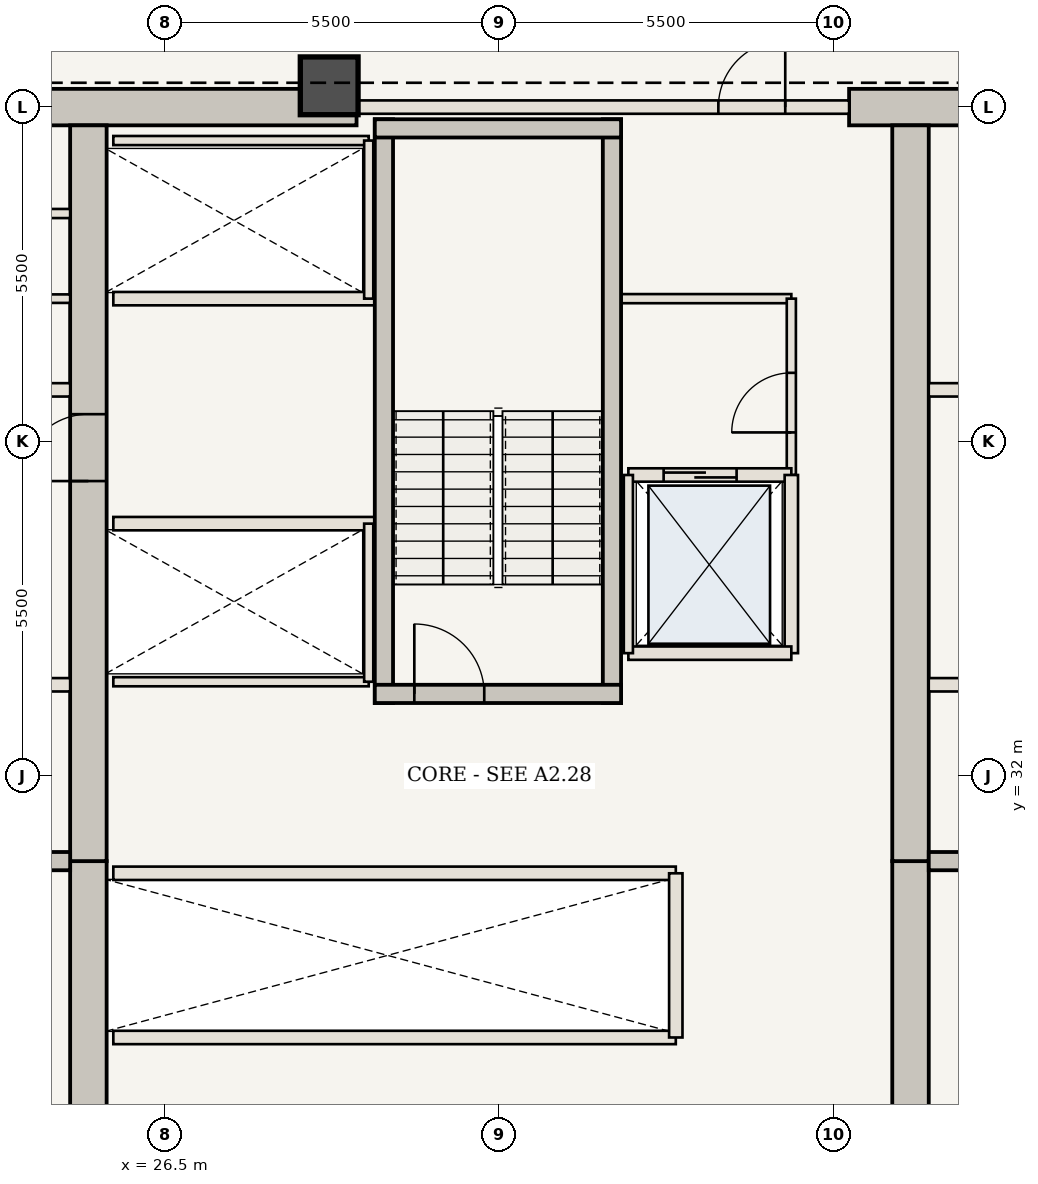
"""IFC4 building model, lengths in metres.
Left out: names, types, materials, properties, quantities, classifications, styles, units other than length and angle.
Written with IfcOpenShell. Run it as: python <this file> out.ifc"""

import sys

from ifc_helpers import new_model, si_unit, direction, frame, frame_2d, origin, origin_2d, place, context, subcontext, project, spatial, rectangle, extrude, element, fill, save


model = new_model("IFC4")
c1 = context("Model", 3, precision=1e-05, world=origin(), true_north=direction((0.0, 1.0)))
c2 = subcontext(c1, "Body", "Model", "MODEL_VIEW")
j1 = project(units=[si_unit("LENGTHUNIT", "METRE"), si_unit("PLANEANGLEUNIT", "RADIAN")], contexts=[c1])
p1 = place(None, origin())
s1 = spatial("IfcSite", under=j1, at=p1, CompositionType="ELEMENT")
p2 = place(p1, origin())
s2 = spatial("IfcBuilding", under=s1, at=p2, CompositionType="ELEMENT")
p3 = place(p2, frame((0.0, 0.0, 118.3)))
s3 = spatial("IfcBuildingStorey", under=s2, at=p3, CompositionType="ELEMENT", Elevation=118.3)
p4 = place(p3, frame((21.41, 43.0, 0.0), z_axis=(0.0, 0.0, 1.0), x_axis=(1.0, 0.0, 0.0)))
e1 = element("IfcWall", 1, at=p4, inside=s3, PredefinedType="SHEAR", context=c2, shape_type="SweptSolid", body=[
    extrude(rectangle(XDim=8.24, YDim=0.6, at=frame_2d((4.12, 0.0))), origin(), (0.0, 0.0, 1.0), 3.85),
])
p5 = place(p3, frame((37.75, 43.0, 0.0), z_axis=(0.0, 0.0, 1.0), x_axis=(1.0, 0.0, 0.0)))
e2 = element("IfcWall", 2, at=p5, inside=s3, PredefinedType="SHEAR", context=c2, shape_type="SweptSolid", body=[
    extrude(rectangle(XDim=4.84, YDim=0.6, at=frame_2d((2.42, 0.0))), origin(), (0.0, 0.0, 1.0), 3.85),
])
p6 = place(p3, frame((25.24, 21.25, 0.0), z_axis=(0.0, 0.0, 1.0), x_axis=(0.0, 1.0, 0.0)))
e3 = element("IfcWall", 3, at=p6, inside=s3, PredefinedType="SHEAR", context=c2, shape_type="SweptSolid", body=[
    extrude(rectangle(XDim=9.35, YDim=0.6, at=frame_2d((4.675, 0.0))), origin(), (0.0, 0.0, 1.0), 3.85),
])
p7 = place(p3, frame((25.24, 30.6, 0.0), z_axis=(0.0, 0.0, 1.0), x_axis=(0.0, 1.0, 0.0)))
e4 = element("IfcWall", 4, at=p7, inside=s3, PredefinedType="SHEAR", context=c2, shape_type="SweptSolid", body=[
    extrude(rectangle(XDim=12.1, YDim=0.6, at=frame_2d((6.05, 0.0))), origin(), (0.0, 0.0, 1.0), 3.85),
])
p8 = place(p7, frame((6.25, 0.0, 0.0)))
e5 = element("IfcOpeningElement", 5, at=p8, cuts=e4, PredefinedType="OPENING", context=c2, shape_type="SweptSolid", body=[
    extrude(rectangle(XDim=1.1, YDim=2.15, at=frame_2d((0.55, 1.075))), frame((0.0, 0.31, 0.0), z_axis=(0.0, -1.0, 0.0), x_axis=(1.0, 0.0, 0.0)), (0.0, 0.0, 1.0), 0.62),
])
p9 = place(p3, frame((38.76, 21.25, 0.0), z_axis=(0.0, 0.0, 1.0), x_axis=(0.0, 1.0, 0.0)))
e6 = element("IfcWall", 6, at=p9, inside=s3, PredefinedType="SHEAR", context=c2, shape_type="SweptSolid", body=[
    extrude(rectangle(XDim=9.35, YDim=0.6, at=frame_2d((4.675, 0.0))), origin(), (0.0, 0.0, 1.0), 3.85),
])
p10 = place(p3, frame((38.76, 30.6, 0.0), z_axis=(0.0, 0.0, 1.0), x_axis=(0.0, 1.0, 0.0)))
e7 = element("IfcWall", 7, at=p10, inside=s3, PredefinedType="SHEAR", context=c2, shape_type="SweptSolid", body=[
    extrude(rectangle(XDim=12.1, YDim=0.6, at=frame_2d((6.05, 0.0))), origin(), (0.0, 0.0, 1.0), 3.85),
])
p11 = place(p3, frame((29.2, 43.35, 0.0), z_axis=(0.0, 0.0, 1.0), x_axis=(1.0, 0.0, 0.0)))
e8 = element("IfcColumn", 8, at=p11, inside=s3, PredefinedType="COLUMN", context=c2, shape_type="SweptSolid", body=[
    extrude(rectangle(XDim=0.95, YDim=0.95, at=origin_2d()), origin(), (0.0, 0.0, 1.0), 3.85),
])
for number, where, z_axis, x_axis in (
    (9, (21.41, 30.6, 0.0), (0.0, 0.0, 1.0), (1.0, 0.0, 0.0)),
    (10, (39.06, 30.6, 0.0), (0.0, 0.0, 1.0), (1.0, 0.0, 0.0)),
):
    element("IfcWall", number, at=place(p3, frame(where, z_axis=z_axis, x_axis=x_axis)), inside=s3, PredefinedType="SHEAR", context=c2, shape_type="SweptSolid", body=[
        extrude(rectangle(XDim=3.53, YDim=0.3, at=frame_2d((1.765, 0.0))), origin(), (0.0, 0.0, 1.0), 3.685),
    ])
p12 = place(p3, frame((21.41, 33.5, 0.0), z_axis=(0.0, 0.0, 1.0), x_axis=(1.0, 0.0, 0.0)))
e11 = element("IfcWall", 11, at=p12, inside=s3, PredefinedType="STANDARD", context=c2, shape_type="SweptSolid", body=[
    extrude(rectangle(XDim=3.53, YDim=0.22, at=frame_2d((1.765, 0.0))), origin(), (0.0, 0.0, 1.0), 3.685),
])
p13 = place(p12, frame((0.75, 0.0, 0.0)))
e12 = element("IfcOpeningElement", 12, at=p13, cuts=e11, PredefinedType="OPENING", context=c2, shape_type="SweptSolid", body=[
    extrude(rectangle(XDim=1.2, YDim=2.2, at=frame_2d((0.6, 1.1))), frame((0.0, 0.12, 0.0), z_axis=(0.0, -1.0, 0.0), x_axis=(1.0, 0.0, 0.0)), (0.0, 0.0, 1.0), 0.24),
])
p14 = place(p3, frame((39.06, 33.5, 0.0), z_axis=(0.0, 0.0, 1.0), x_axis=(1.0, 0.0, 0.0)))
e13 = element("IfcWall", 13, at=p14, inside=s3, PredefinedType="STANDARD", context=c2, shape_type="SweptSolid", body=[
    extrude(rectangle(XDim=3.53, YDim=0.22, at=frame_2d((1.765, 0.0))), origin(), (0.0, 0.0, 1.0), 3.685),
])
p15 = place(p14, frame((1.55, 0.0, 0.0)))
e14 = element("IfcOpeningElement", 14, at=p15, cuts=e13, PredefinedType="OPENING", context=c2, shape_type="SweptSolid", body=[
    extrude(rectangle(XDim=1.2, YDim=2.2, at=frame_2d((0.6, 1.1))), frame((0.0, 0.12, 0.0), z_axis=(0.0, -1.0, 0.0), x_axis=(1.0, 0.0, 0.0)), (0.0, 0.0, 1.0), 0.24),
])
for number, where, z_axis, x_axis in (
    (15, (21.41, 38.35, 0.0), (0.0, 0.0, 1.0), (1.0, 0.0, 0.0)),
    (16, (39.06, 38.35, 0.0), (0.0, 0.0, 1.0), (1.0, 0.0, 0.0)),
):
    element("IfcWall", number, at=place(p3, frame(where, z_axis=z_axis, x_axis=x_axis)), inside=s3, PredefinedType="STANDARD", context=c2, shape_type="SweptSolid", body=[
        extrude(rectangle(XDim=3.53, YDim=0.22, at=frame_2d((1.765, 0.0))), origin(), (0.0, 0.0, 1.0), 3.685),
    ])
p16 = place(p3, frame((21.41, 39.85, 0.0), z_axis=(0.0, 0.0, 1.0), x_axis=(1.0, 0.0, 0.0)))
e17 = element("IfcWall", 17, at=p16, inside=s3, PredefinedType="STANDARD", context=c2, shape_type="SweptSolid", body=[
    extrude(rectangle(XDim=3.53, YDim=0.14, at=frame_2d((1.765, 0.0))), origin(), (0.0, 0.0, 1.0), 3.685),
])
p17 = place(p3, frame((21.41, 41.25, 0.0), z_axis=(0.0, 0.0, 1.0), x_axis=(1.0, 0.0, 0.0)))
e18 = element("IfcWall", 18, at=p17, inside=s3, PredefinedType="STANDARD", context=c2, shape_type="SweptSolid", body=[
    extrude(rectangle(XDim=3.53, YDim=0.15, at=frame_2d((1.765, 0.0))), origin(), (0.0, 0.0, 1.0), 3.685),
])
p18 = place(p3, frame((34.0, 39.85, 0.0), z_axis=(0.0, 0.0, 1.0), x_axis=(1.0, 0.0, 0.0)))
e19 = element("IfcWall", 19, at=p18, inside=s3, PredefinedType="STANDARD", context=c2, shape_type="SweptSolid", body=[
    extrude(rectangle(XDim=2.8, YDim=0.15, at=frame_2d((1.4, 0.0))), origin(), (0.0, 0.0, 1.0), 3.685),
])
p19 = place(p3, frame((36.8, 36.95, 0.0), z_axis=(0.0, 0.0, 1.0), x_axis=(0.0, 1.0, 0.0)))
e20 = element("IfcWall", 20, at=p19, inside=s3, PredefinedType="STANDARD", context=c2, shape_type="SweptSolid", body=[
    extrude(rectangle(XDim=2.9, YDim=0.15, at=frame_2d((1.45, 0.0))), origin(), (0.0, 0.0, 1.0), 3.685),
])
p20 = place(p19, frame((0.7, 0.0, 0.0)))
e21 = element("IfcOpeningElement", 21, at=p20, cuts=e20, PredefinedType="OPENING", context=c2, shape_type="SweptSolid", body=[
    extrude(rectangle(XDim=0.98, YDim=2.2, at=frame_2d((0.49, 1.1))), frame((0.0, 0.085, 0.0), z_axis=(0.0, -1.0, 0.0), x_axis=(1.0, 0.0, 0.0)), (0.0, 0.0, 1.0), 0.17),
])
for number, where, z_axis, x_axis in (
    (22, (25.65, 27.7, 0.0), (0.0, 0.0, 1.0), (1.0, 0.0, 0.0)),
    (23, (25.65, 30.4, 0.0), (0.0, 0.0, 1.0), (1.0, 0.0, 0.0)),
):
    element("IfcWall", number, at=place(p3, frame(where, z_axis=z_axis, x_axis=x_axis)), inside=s3, PredefinedType="STANDARD", context=c2, shape_type="SweptSolid", body=[
        extrude(rectangle(XDim=9.25, YDim=0.22, at=frame_2d((4.625, 0.0))), origin(), (0.0, 0.0, 1.0), 3.685),
    ])
p21 = place(p3, frame((34.9, 27.7, 0.0), z_axis=(0.0, 0.0, 1.0), x_axis=(0.0, 1.0, 0.0)))
e24 = element("IfcWall", 24, at=p21, inside=s3, PredefinedType="STANDARD", context=c2, shape_type="SweptSolid", body=[
    extrude(rectangle(XDim=2.7, YDim=0.22, at=frame_2d((1.35, 0.0))), origin(), (0.0, 0.0, 1.0), 3.685),
])
p22 = place(p3, frame((25.65, 36.15, 0.0), z_axis=(0.0, 0.0, 1.0), x_axis=(1.0, 0.0, 0.0)))
e25 = element("IfcWall", 25, at=p22, inside=s3, PredefinedType="STANDARD", context=c2, shape_type="SweptSolid", body=[
    extrude(rectangle(XDim=4.3, YDim=0.22, at=frame_2d((2.15, 0.0))), origin(), (0.0, 0.0, 1.0), 3.685),
])
p23 = place(p3, frame((25.65, 33.55, 0.0), z_axis=(0.0, 0.0, 1.0), x_axis=(1.0, 0.0, 0.0)))
e26 = element("IfcWall", 26, at=p23, inside=s3, PredefinedType="STANDARD", context=c2, shape_type="SweptSolid", body=[
    extrude(rectangle(XDim=4.2, YDim=0.15, at=frame_2d((2.1, 0.0))), origin(), (0.0, 0.0, 1.0), 3.685),
])
p24 = place(p3, frame((29.85, 33.55, 0.0), z_axis=(0.0, 0.0, 1.0), x_axis=(0.0, 1.0, 0.0)))
e27 = element("IfcWall", 27, at=p24, inside=s3, PredefinedType="STANDARD", context=c2, shape_type="SweptSolid", body=[
    extrude(rectangle(XDim=2.6, YDim=0.15, at=frame_2d((1.3, 0.0))), origin(), (0.0, 0.0, 1.0), 3.685),
])
p25 = place(p3, frame((25.65, 39.85, 0.0), z_axis=(0.0, 0.0, 1.0), x_axis=(1.0, 0.0, 0.0)))
e28 = element("IfcWall", 28, at=p25, inside=s3, PredefinedType="STANDARD", context=c2, shape_type="SweptSolid", body=[
    extrude(rectangle(XDim=4.3, YDim=0.22, at=frame_2d((2.15, 0.0))), origin(), (0.0, 0.0, 1.0), 3.685),
])
p26 = place(p3, frame((25.65, 42.45, 0.0), z_axis=(0.0, 0.0, 1.0), x_axis=(1.0, 0.0, 0.0)))
e29 = element("IfcWall", 29, at=p26, inside=s3, PredefinedType="STANDARD", context=c2, shape_type="SweptSolid", body=[
    extrude(rectangle(XDim=4.2, YDim=0.15, at=frame_2d((2.1, 0.0))), origin(), (0.0, 0.0, 1.0), 3.685),
])
p27 = place(p3, frame((29.85, 39.85, 0.0), z_axis=(0.0, 0.0, 1.0), x_axis=(0.0, 1.0, 0.0)))
e30 = element("IfcWall", 30, at=p27, inside=s3, PredefinedType="STANDARD", context=c2, shape_type="SweptSolid", body=[
    extrude(rectangle(XDim=2.6, YDim=0.15, at=frame_2d((1.3, 0.0))), origin(), (0.0, 0.0, 1.0), 3.685),
])
for number, where, z_axis, x_axis in (
    (31, (30.1, 33.2, 0.0), (0.0, 0.0, 1.0), (0.0, 1.0, 0.0)),
    (32, (33.85, 33.2, 0.0), (0.0, 0.0, 1.0), (0.0, 1.0, 0.0)),
):
    element("IfcWall", number, at=place(p3, frame(where, z_axis=z_axis, x_axis=x_axis)), inside=s3, PredefinedType="SHEAR", context=c2, shape_type="SweptSolid", body=[
        extrude(rectangle(XDim=9.6, YDim=0.3, at=frame_2d((4.8, 0.0))), origin(), (0.0, 0.0, 1.0), 3.685),
    ])
p28 = place(p3, frame((29.95, 33.35, 0.0), z_axis=(0.0, 0.0, 1.0), x_axis=(1.0, 0.0, 0.0)))
e33 = element("IfcWall", 33, at=p28, inside=s3, PredefinedType="SHEAR", context=c2, shape_type="SweptSolid", body=[
    extrude(rectangle(XDim=4.05, YDim=0.3, at=frame_2d((2.025, 0.0))), origin(), (0.0, 0.0, 1.0), 3.685),
])
p29 = place(p28, frame((0.65, 0.0, 0.0)))
e34 = element("IfcOpeningElement", 34, at=p29, cuts=e33, PredefinedType="OPENING", context=c2, shape_type="SweptSolid", body=[
    extrude(rectangle(XDim=1.15, YDim=2.15, at=frame_2d((0.575, 1.075))), frame((0.0, 0.16, 0.0), z_axis=(0.0, -1.0, 0.0), x_axis=(1.0, 0.0, 0.0)), (0.0, 0.0, 1.0), 0.32),
])
p30 = place(p3, frame((29.95, 42.65, 0.0), z_axis=(0.0, 0.0, 1.0), x_axis=(1.0, 0.0, 0.0)))
e35 = element("IfcWall", 35, at=p30, inside=s3, PredefinedType="SHEAR", context=c2, shape_type="SweptSolid", body=[
    extrude(rectangle(XDim=4.05, YDim=0.3, at=frame_2d((2.025, 0.0))), origin(), (0.0, 0.0, 1.0), 3.685),
])
p31 = place(p3, frame((29.65, 43.0, 0.0), z_axis=(0.0, 0.0, 1.0), x_axis=(1.0, 0.0, 0.0)))
e36 = element("IfcWall", 36, at=p31, inside=s3, PredefinedType="STANDARD", context=c2, shape_type="SweptSolid", body=[
    extrude(rectangle(XDim=8.1, YDim=0.22, at=frame_2d((4.05, 0.0))), origin(), (0.0, 0.0, 1.0), 3.685),
])
p32 = place(p31, frame((5.95, 0.0, 0.0)))
e37 = element("IfcOpeningElement", 37, at=p32, cuts=e36, PredefinedType="OPENING", context=c2, shape_type="SweptSolid", body=[
    extrude(rectangle(XDim=1.1, YDim=2.15, at=frame_2d((0.55, 1.075))), frame((0.0, 0.12, 0.0), z_axis=(0.0, -1.0, 0.0), x_axis=(1.0, 0.0, 0.0)), (0.0, 0.0, 1.0), 0.24),
])
p33 = place(p3, frame((34.12, 36.95, 0.0), z_axis=(0.0, 0.0, 1.0), x_axis=(1.0, 0.0, 0.0)))
e38 = element("IfcWall", 38, at=p33, inside=s3, PredefinedType="STANDARD", context=c2, shape_type="SweptSolid", body=[
    extrude(rectangle(XDim=2.68, YDim=0.22, at=frame_2d((1.34, 0.0))), origin(), (0.0, 0.0, 1.0), 3.685),
])
p34 = place(p33, frame((0.58, 0.0, 0.0)))
e39 = element("IfcOpeningElement", 39, at=p34, cuts=e38, PredefinedType="OPENING", context=c2, shape_type="SweptSolid", body=[
    extrude(rectangle(XDim=1.2, YDim=2.2, at=frame_2d((0.6, 1.1))), frame((0.0, 0.12, 0.0), z_axis=(0.0, -1.0, 0.0), x_axis=(1.0, 0.0, 0.0)), (0.0, 0.0, 1.0), 0.24),
])
p35 = place(p3, frame((36.8, 34.02, 0.0), z_axis=(0.0, 0.0, 1.0), x_axis=(0.0, 1.0, 0.0)))
e40 = element("IfcWall", 40, at=p35, inside=s3, PredefinedType="STANDARD", context=c2, shape_type="SweptSolid", body=[
    extrude(rectangle(XDim=2.93, YDim=0.22, at=frame_2d((1.465, 0.0))), origin(), (0.0, 0.0, 1.0), 3.685),
])
p36 = place(p3, frame((34.12, 34.02, 0.0), z_axis=(0.0, 0.0, 1.0), x_axis=(1.0, 0.0, 0.0)))
e41 = element("IfcWall", 41, at=p36, inside=s3, PredefinedType="STANDARD", context=c2, shape_type="SweptSolid", body=[
    extrude(rectangle(XDim=2.68, YDim=0.22, at=frame_2d((1.34, 0.0))), origin(), (0.0, 0.0, 1.0), 3.685),
])
p37 = place(p3, frame((34.12, 34.02, 0.0), z_axis=(0.0, 0.0, 1.0), x_axis=(0.0, 1.0, 0.0)))
e42 = element("IfcWall", 42, at=p37, inside=s3, PredefinedType="STANDARD", context=c2, shape_type="SweptSolid", body=[
    extrude(rectangle(XDim=2.93, YDim=0.15, at=frame_2d((1.465, 0.0))), origin(), (0.0, 0.0, 1.0), 3.685),
])
p38 = place(p8, origin())
e43 = element("IfcDoor", 43, at=p38, inside=s3, OperationType="SINGLE_SWING_LEFT", PredefinedType="DOOR", context=c2, shape_type="SweptSolid", body=[
    extrude(rectangle(XDim=1.1, YDim=2.15, at=frame_2d((0.55, 1.075))), frame((0.0, 0.025, 0.0), z_axis=(0.0, -1.0, 0.0), x_axis=(1.0, 0.0, 0.0)), (0.0, 0.0, 1.0), 0.05),
])
fill(e5, e43)
p39 = place(p20, origin())
e44 = element("IfcDoor", 44, at=p39, inside=s3, OperationType="SINGLE_SWING_LEFT", PredefinedType="DOOR", context=c2, shape_type="SweptSolid", body=[
    extrude(rectangle(XDim=0.98, YDim=2.2, at=frame_2d((0.49, 1.1))), frame((0.0, 0.025, 0.0), z_axis=(0.0, -1.0, 0.0), x_axis=(1.0, 0.0, 0.0)), (0.0, 0.0, 1.0), 0.05),
])
fill(e21, e44)
p40 = place(p29, origin())
e45 = element("IfcDoor", 45, at=p40, inside=s3, OperationType="SINGLE_SWING_LEFT", PredefinedType="DOOR", context=c2, shape_type="SweptSolid", body=[
    extrude(rectangle(XDim=1.15, YDim=2.15, at=frame_2d((0.575, 1.075))), frame((0.0, 0.025, 0.0), z_axis=(0.0, -1.0, 0.0), x_axis=(1.0, 0.0, 0.0)), (0.0, 0.0, 1.0), 0.05),
])
fill(e34, e45)
p41 = place(p32, origin())
e46 = element("IfcDoor", 46, at=p41, inside=s3, OperationType="SINGLE_SWING_RIGHT", PredefinedType="DOOR", context=c2, shape_type="SweptSolid", body=[
    extrude(rectangle(XDim=1.1, YDim=2.15, at=frame_2d((0.55, 1.075))), frame((0.0, 0.025, 0.0), z_axis=(0.0, -1.0, 0.0), x_axis=(1.0, 0.0, 0.0)), (0.0, 0.0, 1.0), 0.05),
])
fill(e37, e46)
p42 = place(p34, origin())
e47 = element("IfcDoor", 47, at=p42, inside=s3, OperationType="DOUBLE_DOOR_SLIDING", PredefinedType="DOOR", context=c2, shape_type="SweptSolid", body=[
    extrude(rectangle(XDim=1.2, YDim=2.2, at=frame_2d((0.6, 1.1))), frame((0.0, 0.025, 0.0), z_axis=(0.0, -1.0, 0.0), x_axis=(1.0, 0.0, 0.0)), (0.0, 0.0, 1.0), 0.05),
])
fill(e39, e47)
save(model, sys.argv[1])
